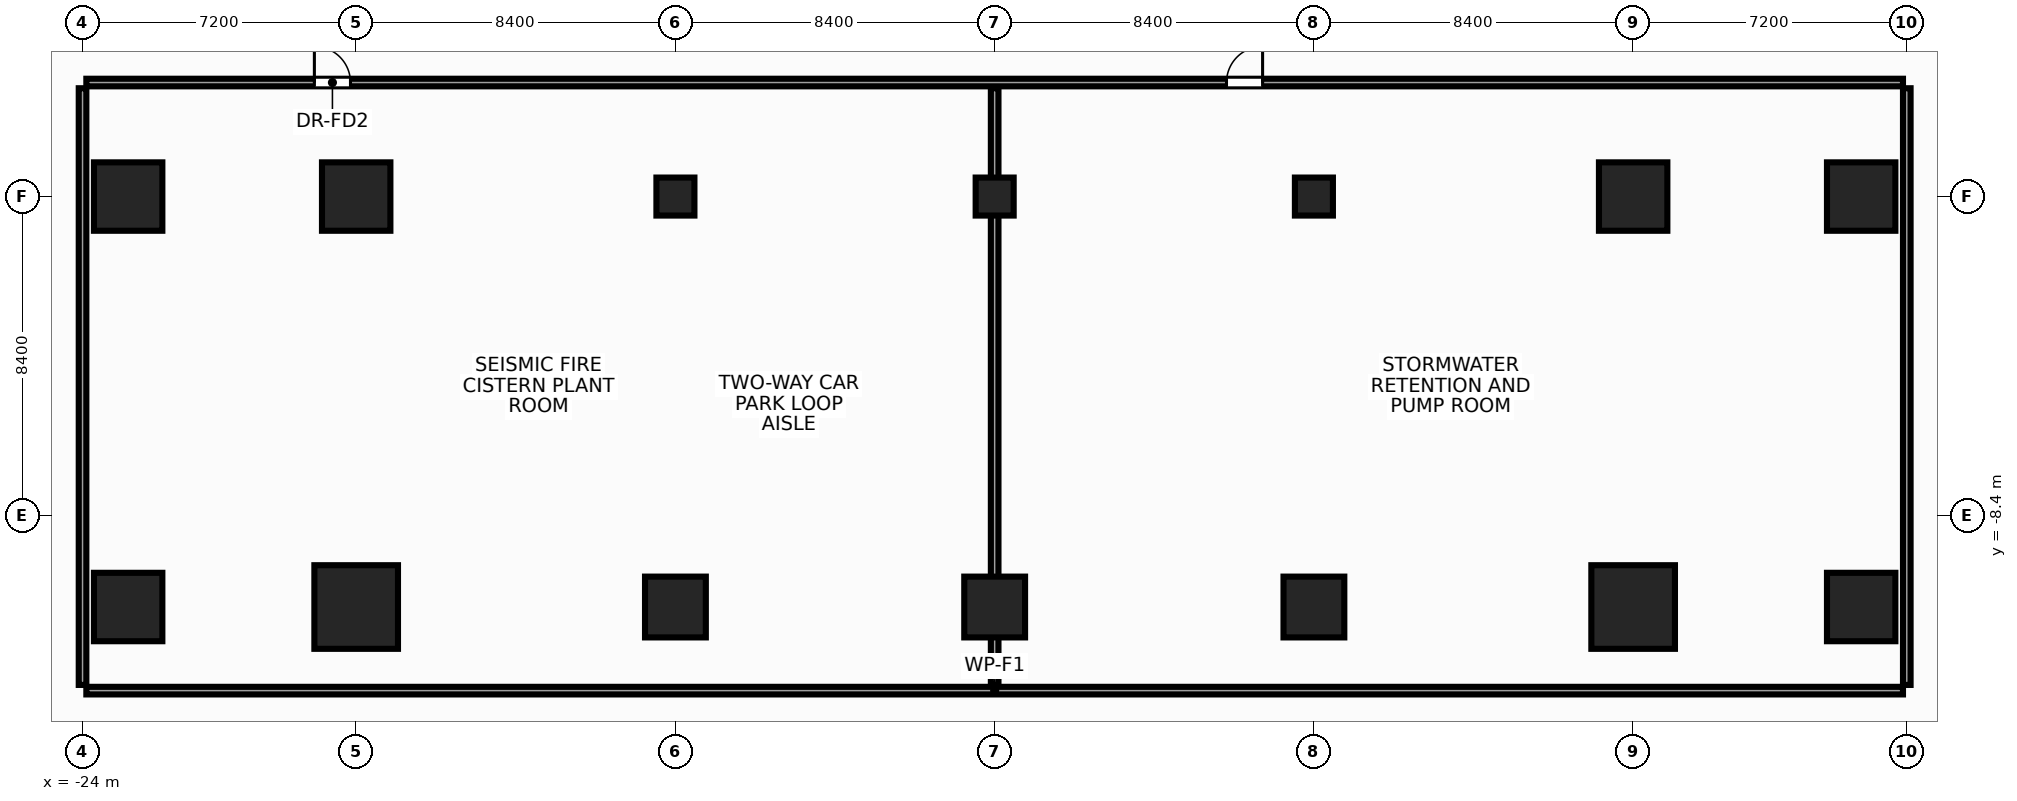
"""IFC4 building model, lengths in metres.
Left out: names, types, materials, properties, quantities, classifications, styles, units other than length and angle.
Written with IfcOpenShell. Run it as: python <this file> out.ifc"""

import sys

from ifc_helpers import new_model, si_unit, direction, frame, frame_2d, origin, origin_with_axes, origin_2d, place, context, subcontext, project, spatial, rectangle, hollow_rectangle, extrude, source, transform, mapped, element, fill, save


model = new_model("IFC4")
c1 = context("Model", 3, precision=1e-05, world=origin(), true_north=direction((0.0, 1.0)))
c2 = subcontext(c1, "Body", "Model", "MODEL_VIEW")
j1 = project(units=[si_unit("LENGTHUNIT", "METRE"), si_unit("PLANEANGLEUNIT", "RADIAN")], contexts=[c1])
p1 = place(None, origin())
s1 = spatial("IfcSite", under=j1, at=p1, CompositionType="ELEMENT")
p2 = place(p1, origin())
s2 = spatial("IfcBuilding", under=s1, at=p2, CompositionType="ELEMENT")
p3 = place(p2, frame((0.0, 0.0, -11.0)))
s3 = spatial("IfcBuildingStorey", under=s2, at=p3, CompositionType="ELEMENT", Elevation=-11.0)
m1 = source(origin(), c2, "Body", "SweptSolid", [
    extrude(rectangle(XDim=2.2, YDim=2.2, at=origin_2d()), origin(), (0.0, 0.0, 1.0), 5.5),
])
p4 = place(p3, frame((-16.8, -10.8, 0.0), z_axis=(0.0, 0.0, 1.0), x_axis=(1.0, 0.0, 0.0)))
e1 = element("IfcColumn", 1, at=p4, inside=s3, PredefinedType="COLUMN", context=c2, shape_type="MappedRepresentation", body=[
    mapped(m1, transform((0.0, 0.0, 0.0), x_axis=(1.0, 0.0, 0.0), y_axis=(0.0, 1.0, 0.0), z_axis=(0.0, 0.0, 1.0), scale=1.0)),
])
m2 = source(origin(), c2, "Body", "SweptSolid", [
    extrude(rectangle(XDim=1.8, YDim=1.8, at=origin_2d()), origin(), (0.0, 0.0, 1.0), 5.5),
])
p5 = place(p3, frame((-16.8, 0.0, 0.0), z_axis=(0.0, 0.0, 1.0), x_axis=(1.0, 0.0, 0.0)))
e2 = element("IfcColumn", 2, at=p5, inside=s3, PredefinedType="COLUMN", context=c2, shape_type="MappedRepresentation", body=[
    mapped(m2, transform((0.0, 0.0, 0.0), x_axis=(1.0, 0.0, 0.0), y_axis=(0.0, 1.0, 0.0), z_axis=(0.0, 0.0, 1.0), scale=1.0)),
])
p6 = place(p3, frame((16.8, -10.8, 0.0), z_axis=(0.0, 0.0, 1.0), x_axis=(1.0, 0.0, 0.0)))
e3 = element("IfcColumn", 3, at=p6, inside=s3, PredefinedType="COLUMN", context=c2, shape_type="MappedRepresentation", body=[
    mapped(m1, transform((0.0, 0.0, 0.0), x_axis=(1.0, 0.0, 0.0), y_axis=(0.0, 1.0, 0.0), z_axis=(0.0, 0.0, 1.0), scale=1.0)),
])
for number, where, z_axis, x_axis in (
    (4, (16.8, 0.0, 0.0), (0.0, 0.0, 1.0), (1.0, 0.0, 0.0)),
    (5, (-22.8, -10.8, 0.0), (0.0, 0.0, 1.0), (1.0, 0.0, 0.0)),
    (6, (-22.8, 0.0, 0.0), (0.0, 0.0, 1.0), (1.0, 0.0, 0.0)),
    (7, (22.8, -10.8, 0.0), (0.0, 0.0, 1.0), (1.0, 0.0, 0.0)),
    (8, (22.8, 0.0, 0.0), (0.0, 0.0, 1.0), (1.0, 0.0, 0.0)),
):
    element("IfcColumn", number, at=place(p3, frame(where, z_axis=z_axis, x_axis=x_axis)), inside=s3, PredefinedType="COLUMN", context=c2, shape_type="MappedRepresentation", body=[
        mapped(m2, transform((0.0, 0.0, 0.0), x_axis=(1.0, 0.0, 0.0), y_axis=(0.0, 1.0, 0.0), z_axis=(0.0, 0.0, 1.0), scale=1.0)),
    ])
m3 = source(origin(), c2, "Body", "SweptSolid", [
    extrude(hollow_rectangle(XDim=1.0, YDim=1.0, WallThickness=0.045, at=origin_2d()), origin(), (0.0, 0.0, 1.0), 5.5),
])
p7 = place(p3, frame((-8.4, 0.0, 0.0), z_axis=(0.0, 0.0, 1.0), x_axis=(1.0, 0.0, 0.0)))
e9 = element("IfcColumn", 9, at=p7, inside=s3, PredefinedType="COLUMN", context=c2, shape_type="MappedRepresentation", body=[
    mapped(m3, transform((0.0, 0.0, 0.0), x_axis=(1.0, 0.0, 0.0), y_axis=(0.0, 1.0, 0.0), z_axis=(0.0, 0.0, 1.0), scale=1.0)),
])
m4 = source(origin(), c2, "Body", "SweptSolid", [
    extrude(rectangle(XDim=1.6, YDim=1.6, at=origin_2d()), origin(), (0.0, 0.0, 1.0), 5.5),
])
p8 = place(p3, frame((-8.4, -10.8, 0.0), z_axis=(0.0, 0.0, 1.0), x_axis=(1.0, 0.0, 0.0)))
e10 = element("IfcColumn", 10, at=p8, inside=s3, PredefinedType="COLUMN", context=c2, shape_type="MappedRepresentation", body=[
    mapped(m4, transform((0.0, 0.0, 0.0), x_axis=(1.0, 0.0, 0.0), y_axis=(0.0, 1.0, 0.0), z_axis=(0.0, 0.0, 1.0), scale=1.0)),
])
p9 = place(p3, frame((8.4, 0.0, 0.0), z_axis=(0.0, 0.0, 1.0), x_axis=(1.0, 0.0, 0.0)))
e11 = element("IfcColumn", 11, at=p9, inside=s3, PredefinedType="COLUMN", context=c2, shape_type="MappedRepresentation", body=[
    mapped(m3, transform((0.0, 0.0, 0.0), x_axis=(1.0, 0.0, 0.0), y_axis=(0.0, 1.0, 0.0), z_axis=(0.0, 0.0, 1.0), scale=1.0)),
])
for number, where, z_axis, x_axis in (
    (12, (8.4, -10.8, 0.0), (0.0, 0.0, 1.0), (1.0, 0.0, 0.0)),
    (13, (0.0, -10.8, 0.0), (0.0, 0.0, 1.0), (1.0, 0.0, 0.0)),
):
    element("IfcColumn", number, at=place(p3, frame(where, z_axis=z_axis, x_axis=x_axis)), inside=s3, PredefinedType="COLUMN", context=c2, shape_type="MappedRepresentation", body=[
        mapped(m4, transform((0.0, 0.0, 0.0), x_axis=(1.0, 0.0, 0.0), y_axis=(0.0, 1.0, 0.0), z_axis=(0.0, 0.0, 1.0), scale=1.0)),
    ])
m5 = source(origin(), c2, "Body", "SweptSolid", [
    extrude(rectangle(XDim=1.0, YDim=1.0, at=origin_2d()), origin(), (0.0, 0.0, 1.0), 5.5),
])
p10 = place(p3, origin_with_axes())
e14 = element("IfcColumn", 14, at=p10, inside=s3, PredefinedType="COLUMN", context=c2, shape_type="MappedRepresentation", body=[
    mapped(m5, transform((0.0, 0.0, 0.0), x_axis=(1.0, 0.0, 0.0), y_axis=(0.0, 1.0, 0.0), z_axis=(0.0, 0.0, 1.0), scale=1.0)),
])
m6 = source(origin(), c2, "Body", "SweptSolid", [
    extrude(rectangle(XDim=47.8, YDim=0.2, at=frame_2d((23.9, 0.0))), origin(), (0.0, 0.0, 1.0), 4.735),
])
p11 = place(p3, frame((-23.9, -13.0, 0.0), z_axis=(0.0, 0.0, 1.0), x_axis=(1.0, 0.0, 0.0)))
e15 = element("IfcWall", 15, at=p11, inside=s3, PredefinedType="PARTITIONING", context=c2, shape_type="MappedRepresentation", body=[
    mapped(m6, transform((0.0, 0.0, 0.0), x_axis=(1.0, 0.0, 0.0), y_axis=(0.0, 1.0, 0.0), z_axis=(0.0, 0.0, 1.0), scale=1.0)),
])
m7 = source(origin(), c2, "Body", "SweptSolid", [
    extrude(rectangle(XDim=47.8, YDim=0.2, at=frame_2d((23.9, 0.0))), origin(), (0.0, 0.0, 1.0), 4.535),
])
p12 = place(p3, frame((-23.9, 3.0, 0.0), z_axis=(0.0, 0.0, 1.0), x_axis=(1.0, 0.0, 0.0)))
e16 = element("IfcWall", 16, at=p12, inside=s3, PredefinedType="PARTITIONING", context=c2, shape_type="MappedRepresentation", body=[
    mapped(m7, transform((0.0, 0.0, 0.0), x_axis=(1.0, 0.0, 0.0), y_axis=(0.0, 1.0, 0.0), z_axis=(0.0, 0.0, 1.0), scale=1.0)),
])
p13 = place(p12, frame((6.0, 0.0, 0.0)))
e17 = element("IfcOpeningElement", 17, at=p13, cuts=e16, PredefinedType="OPENING", context=c2, shape_type="SweptSolid", body=[
    extrude(rectangle(XDim=0.95, YDim=2.15, at=frame_2d((0.475, 1.075))), frame((0.0, 0.112, 0.0), z_axis=(0.0, -1.0, 0.0), x_axis=(1.0, 0.0, 0.0)), (0.0, 0.0, 1.0), 0.224),
])
p14 = place(p12, frame((30.0, 0.0, 0.0)))
e18 = element("IfcOpeningElement", 18, at=p14, cuts=e16, PredefinedType="OPENING", context=c2, shape_type="SweptSolid", body=[
    extrude(rectangle(XDim=0.95, YDim=2.15, at=frame_2d((0.475, 1.075))), frame((0.0, 0.112, 0.0), z_axis=(0.0, -1.0, 0.0), x_axis=(1.0, 0.0, 0.0)), (0.0, 0.0, 1.0), 0.224),
])
m8 = source(origin(), c2, "Body", "SweptSolid", [
    extrude(rectangle(XDim=15.7, YDim=0.2, at=frame_2d((7.85, 0.0))), origin(), (0.0, 0.0, 1.0), 5.15),
])
for number, where, z_axis, x_axis in (
    (19, (-24.0, -12.85, 0.0), (0.0, 0.0, 1.0), (0.0, 1.0, 0.0)),
    (20, (24.0, -12.85, 0.0), (0.0, 0.0, 1.0), (0.0, 1.0, 0.0)),
):
    element("IfcWall", number, at=place(p3, frame(where, z_axis=z_axis, x_axis=x_axis)), inside=s3, PredefinedType="PARTITIONING", context=c2, shape_type="MappedRepresentation", body=[
        mapped(m8, transform((0.0, 0.0, 0.0), x_axis=(1.0, 0.0, 0.0), y_axis=(0.0, 1.0, 0.0), z_axis=(0.0, 0.0, 1.0), scale=1.0)),
    ])
m9 = source(origin(), c2, "Body", "SweptSolid", [
    extrude(rectangle(XDim=15.7, YDim=0.2, at=frame_2d((7.85, 0.0))), origin(), (0.0, 0.0, 1.0), 4.535),
])
p15 = place(p3, frame((0.0, -12.85, 0.0), z_axis=(0.0, 0.0, 1.0), x_axis=(0.0, 1.0, 0.0)))
e21 = element("IfcWall", 21, at=p15, inside=s3, PredefinedType="PARTITIONING", context=c2, shape_type="MappedRepresentation", body=[
    mapped(m9, transform((0.0, 0.0, 0.0), x_axis=(1.0, 0.0, 0.0), y_axis=(0.0, 1.0, 0.0), z_axis=(0.0, 0.0, 1.0), scale=1.0)),
])
m10 = source(origin(), c2, "Body", "SweptSolid", [
    extrude(rectangle(XDim=0.95, YDim=2.15, at=frame_2d((0.475, 1.075))), frame((0.0, 0.025, 0.0), z_axis=(0.0, -1.0, 0.0), x_axis=(1.0, 0.0, 0.0)), (0.0, 0.0, 1.0), 0.05),
])
p16 = place(p13, origin())
e22 = element("IfcDoor", 22, at=p16, inside=s3, OperationType="SINGLE_SWING_LEFT", PredefinedType="DOOR", context=c2, shape_type="MappedRepresentation", body=[
    mapped(m10, transform((0.0, 0.0, 0.0), x_axis=(1.0, 0.0, 0.0), y_axis=(0.0, 1.0, 0.0), z_axis=(0.0, 0.0, 1.0), scale=1.0)),
])
fill(e17, e22)
p17 = place(p14, origin())
e23 = element("IfcDoor", 23, at=p17, inside=s3, OperationType="SINGLE_SWING_RIGHT", PredefinedType="DOOR", context=c2, shape_type="MappedRepresentation", body=[
    mapped(m10, transform((0.0, 0.0, 0.0), x_axis=(1.0, 0.0, 0.0), y_axis=(0.0, 1.0, 0.0), z_axis=(0.0, 0.0, 1.0), scale=1.0)),
])
fill(e18, e23)
save(model, sys.argv[1])
